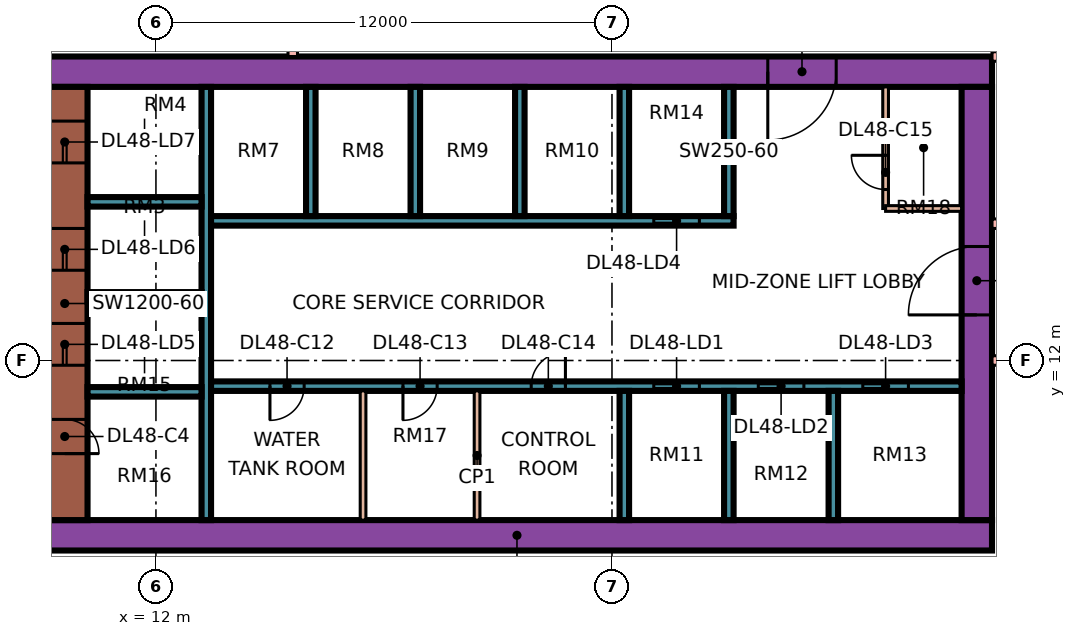
"""IFC4 building model, lengths in metres.
Left out: names, types, materials, properties, quantities, classifications, styles, units other than length and angle.
Written with IfcOpenShell. Run it as: python <this file> out.ifc"""

import sys

from ifc_helpers import new_model, si_unit, direction, frame, frame_2d, origin, place, context, subcontext, project, spatial, rectangle, extrude, element, fill, save


model = new_model("IFC4")
c1 = context("Model", 3, precision=1e-05, world=origin(), true_north=direction((0.0, 1.0)))
c2 = subcontext(c1, "Body", "Model", "MODEL_VIEW")
j1 = project(units=[si_unit("LENGTHUNIT", "METRE"), si_unit("PLANEANGLEUNIT", "RADIAN")], contexts=[c1])
p1 = place(None, origin())
s1 = spatial("IfcSite", under=j1, at=p1, CompositionType="ELEMENT")
p2 = place(p1, origin())
s2 = spatial("IfcBuilding", under=s1, at=p2, CompositionType="ELEMENT")
p3 = place(p2, frame((0.0, 0.0, 206.15)))
s3 = spatial("IfcBuildingStorey", under=s2, at=p3, CompositionType="ELEMENT", Elevation=206.15)
p4 = place(p3, frame((9.0, 7.4, 0.0), z_axis=(0.0, 0.0, 1.0), x_axis=(1.0, 0.0, 0.0)))
e1 = element("IfcWall", 1, at=p4, inside=s3, PredefinedType="SHEAR", context=c2, shape_type="SweptSolid", body=[
    extrude(rectangle(XDim=25.0, YDim=0.8, at=frame_2d((12.5, 0.0))), origin(), (0.0, 0.0, 1.0), 5.5),
])
p5 = place(p3, frame((9.0, 19.6, 0.0), z_axis=(0.0, 0.0, 1.0), x_axis=(1.0, 0.0, 0.0)))
e2 = element("IfcWall", 2, at=p5, inside=s3, PredefinedType="SHEAR", context=c2, shape_type="SweptSolid", body=[
    extrude(rectangle(XDim=25.0, YDim=0.8, at=frame_2d((12.5, 0.0))), origin(), (0.0, 0.0, 1.0), 5.5),
])
p6 = place(p5, frame((19.1, 0.0, 0.0)))
e3 = element("IfcOpeningElement", 3, at=p6, cuts=e2, PredefinedType="OPENING", context=c2, shape_type="SweptSolid", body=[
    extrude(rectangle(XDim=1.8, YDim=2.4, at=frame_2d((0.9, 1.2))), frame((0.0, 0.41, 0.0), z_axis=(0.0, -1.0, 0.0), x_axis=(1.0, 0.0, 0.0)), (0.0, 0.0, 1.0), 0.82),
])
p7 = place(p3, frame((9.6, 7.8, 0.0), z_axis=(0.0, 0.0, 1.0), x_axis=(0.0, 1.0, 0.0)))
e4 = element("IfcWall", 4, at=p7, inside=s3, PredefinedType="SHEAR", context=c2, shape_type="SweptSolid", body=[
    extrude(rectangle(XDim=11.4, YDim=1.2, at=frame_2d((5.7, 0.0))), origin(), (0.0, 0.0, 1.0), 5.5),
])
p8 = place(p7, frame((4.075, 0.0, 0.0)))
e5 = element("IfcOpeningElement", 5, at=p8, cuts=e4, PredefinedType="OPENING", context=c2, shape_type="SweptSolid", body=[
    extrude(rectangle(XDim=1.1, YDim=2.2, at=frame_2d((0.55, 1.1))), frame((0.0, 0.61, 0.0), z_axis=(0.0, -1.0, 0.0), x_axis=(1.0, 0.0, 0.0)), (0.0, 0.0, 1.0), 1.22),
])
p9 = place(p7, frame((6.575, 0.0, 0.0)))
e6 = element("IfcOpeningElement", 6, at=p9, cuts=e4, PredefinedType="OPENING", context=c2, shape_type="SweptSolid", body=[
    extrude(rectangle(XDim=1.1, YDim=2.2, at=frame_2d((0.55, 1.1))), frame((0.0, 0.61, 0.0), z_axis=(0.0, -1.0, 0.0), x_axis=(1.0, 0.0, 0.0)), (0.0, 0.0, 1.0), 1.22),
])
p10 = place(p7, frame((9.4, 0.0, 0.0)))
e7 = element("IfcOpeningElement", 7, at=p10, cuts=e4, PredefinedType="OPENING", context=c2, shape_type="SweptSolid", body=[
    extrude(rectangle(XDim=1.1, YDim=2.2, at=frame_2d((0.55, 1.1))), frame((0.0, 0.61, 0.0), z_axis=(0.0, -1.0, 0.0), x_axis=(1.0, 0.0, 0.0)), (0.0, 0.0, 1.0), 1.22),
])
p11 = place(p7, frame((1.75, 0.0, 0.0)))
e8 = element("IfcOpeningElement", 8, at=p11, cuts=e4, PredefinedType="OPENING", context=c2, shape_type="SweptSolid", body=[
    extrude(rectangle(XDim=0.9, YDim=2.1, at=frame_2d((0.45, 1.05))), frame((0.0, 0.61, 0.0), z_axis=(0.0, -1.0, 0.0), x_axis=(1.0, 0.0, 0.0)), (0.0, 0.0, 1.0), 1.22),
])
p12 = place(p3, frame((33.6, 7.8, 0.0), z_axis=(0.0, 0.0, 1.0), x_axis=(0.0, 1.0, 0.0)))
e9 = element("IfcWall", 9, at=p12, inside=s3, PredefinedType="SHEAR", context=c2, shape_type="SweptSolid", body=[
    extrude(rectangle(XDim=11.4, YDim=0.8, at=frame_2d((5.7, 0.0))), origin(), (0.0, 0.0, 1.0), 5.5),
])
p13 = place(p12, frame((5.4, 0.0, 0.0)))
e10 = element("IfcOpeningElement", 10, at=p13, cuts=e9, PredefinedType="OPENING", context=c2, shape_type="SweptSolid", body=[
    extrude(rectangle(XDim=1.8, YDim=2.4, at=frame_2d((0.9, 1.2))), frame((0.0, 0.41, 0.0), z_axis=(0.0, -1.0, 0.0), x_axis=(1.0, 0.0, 0.0)), (0.0, 0.0, 1.0), 0.82),
])
p14 = place(p3, frame((13.325, 7.8, 0.0), z_axis=(0.0, 0.0, 1.0), x_axis=(0.0, 1.0, 0.0)))
e11 = element("IfcWall", 11, at=p14, inside=s3, PredefinedType="SHEAR", context=c2, shape_type="SweptSolid", body=[
    extrude(rectangle(XDim=11.4, YDim=0.25, at=frame_2d((5.7, 0.0))), origin(), (0.0, 0.0, 1.0), 5.5),
])
p15 = place(p3, frame((13.45, 11.325, 0.0), z_axis=(0.0, 0.0, 1.0), x_axis=(1.0, 0.0, 0.0)))
e12 = element("IfcWall", 12, at=p15, inside=s3, PredefinedType="SHEAR", context=c2, shape_type="SweptSolid", body=[
    extrude(rectangle(XDim=19.75, YDim=0.25, at=frame_2d((9.875, 0.0))), origin(), (0.0, 0.0, 1.0), 5.5),
])
p16 = place(p15, frame((11.65, 0.0, 0.0)))
e13 = element("IfcOpeningElement", 13, at=p16, cuts=e12, PredefinedType="OPENING", context=c2, shape_type="SweptSolid", body=[
    extrude(rectangle(XDim=1.2, YDim=2.2, at=frame_2d((0.6, 1.1))), frame((0.0, 0.135, 0.0), z_axis=(0.0, -1.0, 0.0), x_axis=(1.0, 0.0, 0.0)), (0.0, 0.0, 1.0), 0.27),
])
p17 = place(p15, frame((14.4, 0.0, 0.0)))
e14 = element("IfcOpeningElement", 14, at=p17, cuts=e12, PredefinedType="OPENING", context=c2, shape_type="SweptSolid", body=[
    extrude(rectangle(XDim=1.2, YDim=2.2, at=frame_2d((0.6, 1.1))), frame((0.0, 0.135, 0.0), z_axis=(0.0, -1.0, 0.0), x_axis=(1.0, 0.0, 0.0)), (0.0, 0.0, 1.0), 0.27),
])
p18 = place(p15, frame((17.15, 0.0, 0.0)))
e15 = element("IfcOpeningElement", 15, at=p18, cuts=e12, PredefinedType="OPENING", context=c2, shape_type="SweptSolid", body=[
    extrude(rectangle(XDim=1.2, YDim=2.2, at=frame_2d((0.6, 1.1))), frame((0.0, 0.135, 0.0), z_axis=(0.0, -1.0, 0.0), x_axis=(1.0, 0.0, 0.0)), (0.0, 0.0, 1.0), 0.27),
])
p19 = place(p15, frame((1.55, 0.0, 0.0)))
e16 = element("IfcOpeningElement", 16, at=p19, cuts=e12, PredefinedType="OPENING", context=c2, shape_type="SweptSolid", body=[
    extrude(rectangle(XDim=0.9, YDim=2.1, at=frame_2d((0.45, 1.05))), frame((0.0, 0.135, 0.0), z_axis=(0.0, -1.0, 0.0), x_axis=(1.0, 0.0, 0.0)), (0.0, 0.0, 1.0), 0.27),
])
p20 = place(p15, frame((5.05, 0.0, 0.0)))
e17 = element("IfcOpeningElement", 17, at=p20, cuts=e12, PredefinedType="OPENING", context=c2, shape_type="SweptSolid", body=[
    extrude(rectangle(XDim=0.9, YDim=2.1, at=frame_2d((0.45, 1.05))), frame((0.0, 0.135, 0.0), z_axis=(0.0, -1.0, 0.0), x_axis=(1.0, 0.0, 0.0)), (0.0, 0.0, 1.0), 0.27),
])
p21 = place(p15, frame((8.425, 0.0, 0.0)))
e18 = element("IfcOpeningElement", 18, at=p21, cuts=e12, PredefinedType="OPENING", context=c2, shape_type="SweptSolid", body=[
    extrude(rectangle(XDim=0.9, YDim=2.1, at=frame_2d((0.45, 1.05))), frame((0.0, 0.135, 0.0), z_axis=(0.0, -1.0, 0.0), x_axis=(1.0, 0.0, 0.0)), (0.0, 0.0, 1.0), 0.27),
])
p22 = place(p3, frame((13.45, 15.675, 0.0), z_axis=(0.0, 0.0, 1.0), x_axis=(1.0, 0.0, 0.0)))
e19 = element("IfcWall", 19, at=p22, inside=s3, PredefinedType="SHEAR", context=c2, shape_type="SweptSolid", body=[
    extrude(rectangle(XDim=13.75, YDim=0.25, at=frame_2d((6.875, 0.0))), origin(), (0.0, 0.0, 1.0), 5.5),
])
p23 = place(p22, frame((11.65, 0.0, 0.0)))
e20 = element("IfcOpeningElement", 20, at=p23, cuts=e19, PredefinedType="OPENING", context=c2, shape_type="SweptSolid", body=[
    extrude(rectangle(XDim=1.2, YDim=2.2, at=frame_2d((0.6, 1.1))), frame((0.0, 0.135, 0.0), z_axis=(0.0, -1.0, 0.0), x_axis=(1.0, 0.0, 0.0)), (0.0, 0.0, 1.0), 0.27),
])
for number, where, z_axis, x_axis in (
    (21, (10.2, 11.175, 0.0), (0.0, 0.0, 1.0), (1.0, 0.0, 0.0)),
    (22, (10.2, 13.675, 0.0), (0.0, 0.0, 1.0), (1.0, 0.0, 0.0)),
    (23, (10.2, 16.175, 0.0), (0.0, 0.0, 1.0), (1.0, 0.0, 0.0)),
):
    element("IfcWall", number, at=place(p3, frame(where, z_axis=z_axis, x_axis=x_axis)), inside=s3, PredefinedType="SHEAR", context=c2, shape_type="SweptSolid", body=[
        extrude(rectangle(XDim=3.0, YDim=0.25, at=frame_2d((1.5, 0.0))), origin(), (0.0, 0.0, 1.0), 5.5),
    ])
for number, where, z_axis, x_axis in (
    (24, (24.325, 7.8, 0.0), (0.0, 0.0, 1.0), (0.0, 1.0, 0.0)),
    (25, (27.075, 7.8, 0.0), (0.0, 0.0, 1.0), (0.0, 1.0, 0.0)),
    (26, (29.825, 7.8, 0.0), (0.0, 0.0, 1.0), (0.0, 1.0, 0.0)),
    (27, (16.075, 15.8, 0.0), (0.0, 0.0, 1.0), (0.0, 1.0, 0.0)),
    (28, (18.825, 15.8, 0.0), (0.0, 0.0, 1.0), (0.0, 1.0, 0.0)),
    (29, (21.575, 15.8, 0.0), (0.0, 0.0, 1.0), (0.0, 1.0, 0.0)),
    (30, (24.325, 15.8, 0.0), (0.0, 0.0, 1.0), (0.0, 1.0, 0.0)),
    (31, (27.075, 15.8, 0.0), (0.0, 0.0, 1.0), (0.0, 1.0, 0.0)),
):
    element("IfcWall", number, at=place(p3, frame(where, z_axis=z_axis, x_axis=x_axis)), inside=s3, PredefinedType="SHEAR", context=c2, shape_type="SweptSolid", body=[
        extrude(rectangle(XDim=3.4, YDim=0.25, at=frame_2d((1.7, 0.0))), origin(), (0.0, 0.0, 1.0), 5.5),
    ])
p24 = place(p3, frame((-1.447, 12.553, 0.0), z_axis=(0.0, 0.0, 1.0), x_axis=(0.707106781187, -0.707106781187, 0.0)))
e32 = element("IfcWall", 32, at=p24, inside=s3, PredefinedType="SOLIDWALL", context=c2, shape_type="SweptSolid", body=[
    extrude(rectangle(XDim=19.799, YDim=0.15, at=frame_2d((9.899, 0.0))), origin(), (0.0, 0.0, 1.0), 5.1),
])
p25 = place(p24, frame((11.453, 0.0, 0.45)))
e33 = element("IfcOpeningElement", 33, at=p25, cuts=e32, PredefinedType="OPENING", context=c2, shape_type="SweptSolid", body=[
    extrude(rectangle(XDim=3.0, YDim=3.6, at=frame_2d((1.5, 1.8))), frame((0.0, 0.085, 0.0), z_axis=(0.0, -1.0, 0.0), x_axis=(1.0, 0.0, 0.0)), (0.0, 0.0, 1.0), 0.17),
])
for number, where, z_axis, x_axis in (
    (34, (17.45, 7.8, 0.0), (0.0, 0.0, 1.0), (0.0, 1.0, 0.0)),
    (35, (20.45, 7.8, 0.0), (0.0, 0.0, 1.0), (0.0, 1.0, 0.0)),
):
    element("IfcWall", number, at=place(p3, frame(where, z_axis=z_axis, x_axis=x_axis)), inside=s3, PredefinedType="PARTITIONING", context=c2, shape_type="SweptSolid", body=[
        extrude(rectangle(XDim=3.4, YDim=0.15, at=frame_2d((1.7, 0.0))), origin(), (0.0, 0.0, 1.0), 5.1),
    ])
p26 = place(p3, frame((31.2, 16.0, 0.0), z_axis=(0.0, 0.0, 1.0), x_axis=(0.0, 1.0, 0.0)))
e36 = element("IfcWall", 36, at=p26, inside=s3, PredefinedType="PARTITIONING", context=c2, shape_type="SweptSolid", body=[
    extrude(rectangle(XDim=3.2, YDim=0.15, at=frame_2d((1.6, 0.0))), origin(), (0.0, 0.0, 1.0), 5.1),
])
p27 = place(p26, frame((0.5, 0.0, 0.0)))
e37 = element("IfcOpeningElement", 37, at=p27, cuts=e36, PredefinedType="OPENING", context=c2, shape_type="SweptSolid", body=[
    extrude(rectangle(XDim=0.9, YDim=2.1, at=frame_2d((0.45, 1.05))), frame((0.0, 0.085, 0.0), z_axis=(0.0, -1.0, 0.0), x_axis=(1.0, 0.0, 0.0)), (0.0, 0.0, 1.0), 0.17),
])
p28 = place(p3, frame((31.2, 16.0, 0.0), z_axis=(0.0, 0.0, 1.0), x_axis=(1.0, 0.0, 0.0)))
e38 = element("IfcWall", 38, at=p28, inside=s3, PredefinedType="PARTITIONING", context=c2, shape_type="SweptSolid", body=[
    extrude(rectangle(XDim=2.0, YDim=0.15, at=frame_2d((1.0, 0.0))), origin(), (0.0, 0.0, 1.0), 5.1),
])
p29 = place(p3, frame((15.6, 20.0, 0.0), z_axis=(0.0, 0.0, 1.0), x_axis=(0.0, 1.0, 0.0)))
e39 = element("IfcWall", 39, at=p29, inside=s3, PredefinedType="PARTITIONING", context=c2, shape_type="SweptSolid", body=[
    extrude(rectangle(XDim=27.775, YDim=0.25, at=frame_2d((13.887, 0.0))), origin(), (0.0, 0.0, 1.0), 5.1),
])
p30 = place(p29, frame((17.15, 0.0, 0.0)))
e40 = element("IfcOpeningElement", 40, at=p30, cuts=e39, PredefinedType="OPENING", context=c2, shape_type="SweptSolid", body=[
    extrude(rectangle(XDim=1.8, YDim=2.1, at=frame_2d((0.9, 1.05))), frame((0.0, 0.135, 0.0), z_axis=(0.0, -1.0, 0.0), x_axis=(1.0, 0.0, 0.0)), (0.0, 0.0, 1.0), 0.27),
])
p31 = place(p29, frame((22.15, 0.0, 0.0)))
e41 = element("IfcOpeningElement", 41, at=p31, cuts=e39, PredefinedType="OPENING", context=c2, shape_type="SweptSolid", body=[
    extrude(rectangle(XDim=1.8, YDim=2.1, at=frame_2d((0.9, 1.05))), frame((0.0, 0.135, 0.0), z_axis=(0.0, -1.0, 0.0), x_axis=(1.0, 0.0, 0.0)), (0.0, 0.0, 1.0), 0.27),
])
p32 = place(p29, frame((26.4, 0.0, 0.0)))
e42 = element("IfcOpeningElement", 42, at=p32, cuts=e39, PredefinedType="OPENING", context=c2, shape_type="SweptSolid", body=[
    extrude(rectangle(XDim=1.2, YDim=2.1, at=frame_2d((0.6, 1.05))), frame((0.0, 0.135, 0.0), z_axis=(0.0, -1.0, 0.0), x_axis=(1.0, 0.0, 0.0)), (0.0, 0.0, 1.0), 0.27),
])
p33 = place(p29, frame((14.65, 0.0, 0.0)))
e43 = element("IfcOpeningElement", 43, at=p33, cuts=e39, PredefinedType="OPENING", context=c2, shape_type="SweptSolid", body=[
    extrude(rectangle(XDim=0.9, YDim=2.1, at=frame_2d((0.45, 1.05))), frame((0.0, 0.135, 0.0), z_axis=(0.0, -1.0, 0.0), x_axis=(1.0, 0.0, 0.0)), (0.0, 0.0, 1.0), 0.27),
])
p34 = place(p29, frame((11.4, 0.0, 0.0)))
e44 = element("IfcOpeningElement", 44, at=p34, cuts=e39, PredefinedType="OPENING", context=c2, shape_type="SweptSolid", body=[
    extrude(rectangle(XDim=0.9, YDim=2.1, at=frame_2d((0.45, 1.05))), frame((0.0, 0.135, 0.0), z_axis=(0.0, -1.0, 0.0), x_axis=(1.0, 0.0, 0.0)), (0.0, 0.0, 1.0), 0.27),
])
p35 = place(p3, frame((34.0, 12.0, 0.0), z_axis=(0.0, 0.0, 1.0), x_axis=(1.0, 0.0, 0.0)))
e45 = element("IfcWall", 45, at=p35, inside=s3, PredefinedType="PARTITIONING", context=c2, shape_type="SweptSolid", body=[
    extrude(rectangle(XDim=3.2, YDim=0.25, at=frame_2d((1.6, 0.0))), origin(), (0.0, 0.0, 1.0), 5.1),
])
p36 = place(p35, frame((0.15, 0.0, 0.0)))
e46 = element("IfcOpeningElement", 46, at=p36, cuts=e45, PredefinedType="OPENING", context=c2, shape_type="SweptSolid", body=[
    extrude(rectangle(XDim=1.2, YDim=2.1, at=frame_2d((0.6, 1.05))), frame((0.0, 0.135, 0.0), z_axis=(0.0, -1.0, 0.0), x_axis=(1.0, 0.0, 0.0)), (0.0, 0.0, 1.0), 0.27),
])
p37 = place(p3, frame((34.0, 15.6, 0.0), z_axis=(0.0, 0.0, 1.0), x_axis=(1.0, 0.0, 0.0)))
e47 = element("IfcWall", 47, at=p37, inside=s3, PredefinedType="PARTITIONING", context=c2, shape_type="SweptSolid", body=[
    extrude(rectangle(XDim=10.35, YDim=0.25, at=frame_2d((5.175, 0.0))), origin(), (0.0, 0.0, 1.0), 5.1),
])
p38 = place(p37, frame((4.05, 0.0, 0.0)))
e48 = element("IfcOpeningElement", 48, at=p38, cuts=e47, PredefinedType="OPENING", context=c2, shape_type="SweptSolid", body=[
    extrude(rectangle(XDim=1.8, YDim=2.1, at=frame_2d((0.9, 1.05))), frame((0.0, 0.135, 0.0), z_axis=(0.0, -1.0, 0.0), x_axis=(1.0, 0.0, 0.0)), (0.0, 0.0, 1.0), 0.27),
])
p39 = place(p3, frame((34.0, 20.0, 0.0), z_axis=(0.0, 0.0, 1.0), x_axis=(1.0, 0.0, 0.0)))
e49 = element("IfcWall", 49, at=p39, inside=s3, PredefinedType="PARTITIONING", context=c2, shape_type="SweptSolid", body=[
    extrude(rectangle(XDim=1.875, YDim=0.25, at=frame_2d((0.938, 0.0))), origin(), (0.0, 0.0, 1.0), 5.1),
])
p40 = place(p16, origin())
e50 = element("IfcDoor", 50, at=p40, inside=s3, OperationType="DOUBLE_DOOR_SLIDING", PredefinedType="DOOR", context=c2, shape_type="SweptSolid", body=[
    extrude(rectangle(XDim=1.2, YDim=2.2, at=frame_2d((0.6, 1.1))), frame((0.0, 0.025, 0.0), z_axis=(0.0, -1.0, 0.0), x_axis=(1.0, 0.0, 0.0)), (0.0, 0.0, 1.0), 0.05),
])
fill(e13, e50)
p41 = place(p17, origin())
e51 = element("IfcDoor", 51, at=p41, inside=s3, OperationType="DOUBLE_DOOR_SLIDING", PredefinedType="DOOR", context=c2, shape_type="SweptSolid", body=[
    extrude(rectangle(XDim=1.2, YDim=2.2, at=frame_2d((0.6, 1.1))), frame((0.0, 0.025, 0.0), z_axis=(0.0, -1.0, 0.0), x_axis=(1.0, 0.0, 0.0)), (0.0, 0.0, 1.0), 0.05),
])
fill(e14, e51)
p42 = place(p18, origin())
e52 = element("IfcDoor", 52, at=p42, inside=s3, OperationType="DOUBLE_DOOR_SLIDING", PredefinedType="DOOR", context=c2, shape_type="SweptSolid", body=[
    extrude(rectangle(XDim=1.2, YDim=2.2, at=frame_2d((0.6, 1.1))), frame((0.0, 0.025, 0.0), z_axis=(0.0, -1.0, 0.0), x_axis=(1.0, 0.0, 0.0)), (0.0, 0.0, 1.0), 0.05),
])
fill(e15, e52)
p43 = place(p23, origin())
e53 = element("IfcDoor", 53, at=p43, inside=s3, OperationType="DOUBLE_DOOR_SLIDING", PredefinedType="DOOR", context=c2, shape_type="SweptSolid", body=[
    extrude(rectangle(XDim=1.2, YDim=2.2, at=frame_2d((0.6, 1.1))), frame((0.0, 0.025, 0.0), z_axis=(0.0, -1.0, 0.0), x_axis=(1.0, 0.0, 0.0)), (0.0, 0.0, 1.0), 0.05),
])
fill(e20, e53)
p44 = place(p8, origin())
e54 = element("IfcDoor", 54, at=p44, inside=s3, OperationType="DOUBLE_DOOR_SLIDING", PredefinedType="DOOR", context=c2, shape_type="SweptSolid", body=[
    extrude(rectangle(XDim=1.1, YDim=2.2, at=frame_2d((0.55, 1.1))), frame((0.0, 0.025, 0.0), z_axis=(0.0, -1.0, 0.0), x_axis=(1.0, 0.0, 0.0)), (0.0, 0.0, 1.0), 0.05),
])
fill(e5, e54)
p45 = place(p9, origin())
e55 = element("IfcDoor", 55, at=p45, inside=s3, OperationType="DOUBLE_DOOR_SLIDING", PredefinedType="DOOR", context=c2, shape_type="SweptSolid", body=[
    extrude(rectangle(XDim=1.1, YDim=2.2, at=frame_2d((0.55, 1.1))), frame((0.0, 0.025, 0.0), z_axis=(0.0, -1.0, 0.0), x_axis=(1.0, 0.0, 0.0)), (0.0, 0.0, 1.0), 0.05),
])
fill(e6, e55)
p46 = place(p10, origin())
e56 = element("IfcDoor", 56, at=p46, inside=s3, OperationType="DOUBLE_DOOR_SLIDING", PredefinedType="DOOR", context=c2, shape_type="SweptSolid", body=[
    extrude(rectangle(XDim=1.1, YDim=2.2, at=frame_2d((0.55, 1.1))), frame((0.0, 0.025, 0.0), z_axis=(0.0, -1.0, 0.0), x_axis=(1.0, 0.0, 0.0)), (0.0, 0.0, 1.0), 0.05),
])
fill(e7, e56)
p47 = place(p13, origin())
e57 = element("IfcDoor", 57, at=p47, inside=s3, OperationType="DOUBLE_DOOR_SINGLE_SWING", PredefinedType="DOOR", context=c2, shape_type="SweptSolid", body=[
    extrude(rectangle(XDim=1.8, YDim=2.4, at=frame_2d((0.9, 1.2))), frame((0.0, 0.025, 0.0), z_axis=(0.0, -1.0, 0.0), x_axis=(1.0, 0.0, 0.0)), (0.0, 0.0, 1.0), 0.05),
])
fill(e10, e57)
p48 = place(p6, frame((1.8, 0.0, 0.0), z_axis=(0.0, 0.0, 1.0), x_axis=(-1.0, 0.0, 0.0)))
e58 = element("IfcDoor", 58, at=p48, inside=s3, OperationType="DOUBLE_DOOR_SINGLE_SWING", PredefinedType="DOOR", context=c2, shape_type="SweptSolid", body=[
    extrude(rectangle(XDim=1.8, YDim=2.4, at=frame_2d((0.9, 1.2))), frame((0.0, 0.025, 0.0), z_axis=(0.0, -1.0, 0.0), x_axis=(1.0, 0.0, 0.0)), (0.0, 0.0, 1.0), 0.05),
])
fill(e3, e58)
p49 = place(p11, frame((0.9, 0.0, 0.0), z_axis=(0.0, 0.0, 1.0), x_axis=(-1.0, 0.0, 0.0)))
e59 = element("IfcDoor", 59, at=p49, inside=s3, OperationType="SINGLE_SWING_LEFT", PredefinedType="DOOR", context=c2, shape_type="SweptSolid", body=[
    extrude(rectangle(XDim=0.9, YDim=2.1, at=frame_2d((0.45, 1.05))), frame((0.0, 0.025, 0.0), z_axis=(0.0, -1.0, 0.0), x_axis=(1.0, 0.0, 0.0)), (0.0, 0.0, 1.0), 0.05),
])
fill(e8, e59)
p50 = place(p19, frame((0.9, 0.0, 0.0), z_axis=(0.0, 0.0, 1.0), x_axis=(-1.0, 0.0, 0.0)))
e60 = element("IfcDoor", 60, at=p50, inside=s3, OperationType="SINGLE_SWING_LEFT", PredefinedType="DOOR", context=c2, shape_type="SweptSolid", body=[
    extrude(rectangle(XDim=0.9, YDim=2.1, at=frame_2d((0.45, 1.05))), frame((0.0, 0.025, 0.0), z_axis=(0.0, -1.0, 0.0), x_axis=(1.0, 0.0, 0.0)), (0.0, 0.0, 1.0), 0.05),
])
fill(e16, e60)
p51 = place(p20, frame((0.9, 0.0, 0.0), z_axis=(0.0, 0.0, 1.0), x_axis=(-1.0, 0.0, 0.0)))
e61 = element("IfcDoor", 61, at=p51, inside=s3, OperationType="SINGLE_SWING_LEFT", PredefinedType="DOOR", context=c2, shape_type="SweptSolid", body=[
    extrude(rectangle(XDim=0.9, YDim=2.1, at=frame_2d((0.45, 1.05))), frame((0.0, 0.025, 0.0), z_axis=(0.0, -1.0, 0.0), x_axis=(1.0, 0.0, 0.0)), (0.0, 0.0, 1.0), 0.05),
])
fill(e17, e61)
p52 = place(p21, frame((0.9, 0.0, 0.0), z_axis=(0.0, 0.0, 1.0), x_axis=(-1.0, 0.0, 0.0)))
e62 = element("IfcDoor", 62, at=p52, inside=s3, OperationType="SINGLE_SWING_RIGHT", PredefinedType="DOOR", context=c2, shape_type="SweptSolid", body=[
    extrude(rectangle(XDim=0.9, YDim=2.1, at=frame_2d((0.45, 1.05))), frame((0.0, 0.025, 0.0), z_axis=(0.0, -1.0, 0.0), x_axis=(1.0, 0.0, 0.0)), (0.0, 0.0, 1.0), 0.05),
])
fill(e18, e62)
p53 = place(p27, frame((0.9, 0.0, 0.0), z_axis=(0.0, 0.0, 1.0), x_axis=(-1.0, 0.0, 0.0)))
e63 = element("IfcDoor", 63, at=p53, inside=s3, OperationType="SINGLE_SWING_RIGHT", PredefinedType="DOOR", context=c2, shape_type="SweptSolid", body=[
    extrude(rectangle(XDim=0.9, YDim=2.1, at=frame_2d((0.45, 1.05))), frame((0.0, 0.025, 0.0), z_axis=(0.0, -1.0, 0.0), x_axis=(1.0, 0.0, 0.0)), (0.0, 0.0, 1.0), 0.05),
])
fill(e37, e63)
save(model, sys.argv[1])
